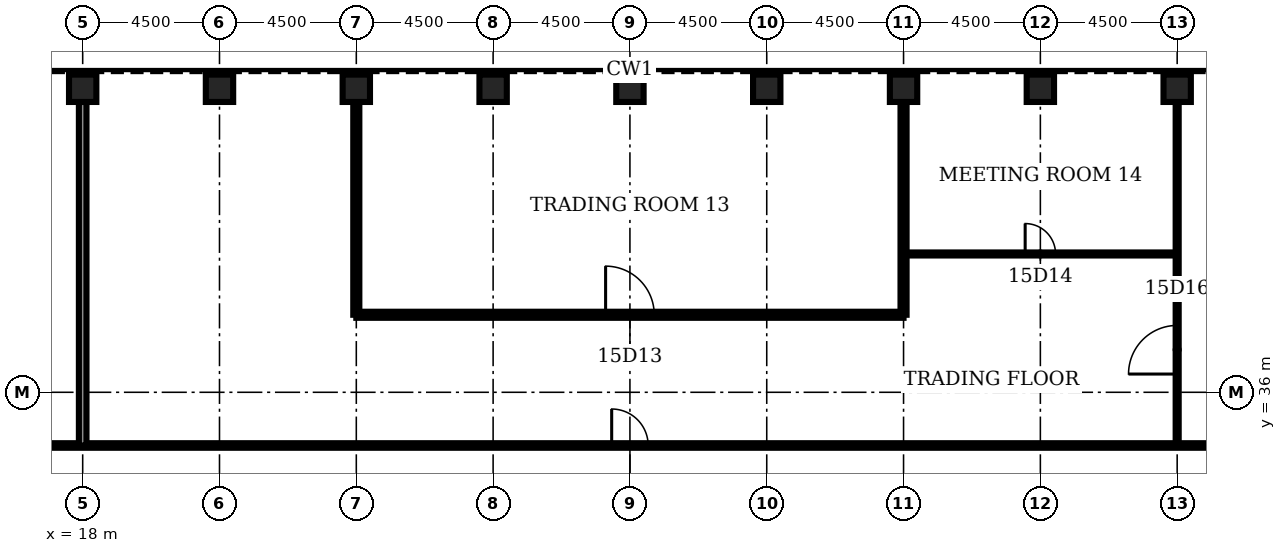
"""IFC4 building model, lengths in metres.
Left out: names, types, materials, properties, quantities, classifications, styles, units other than length and angle.
Written with IfcOpenShell. Run it as: python <this file> out.ifc"""

import sys

from ifc_helpers import new_model, si_unit, direction, frame, frame_2d, origin, origin_2d, place, context, subcontext, project, spatial, rectangle, hollow_rectangle, extrude, element, fill, save


model = new_model("IFC4")
c1 = context("Model", 3, precision=1e-05, world=origin(), true_north=direction((0.0, 1.0)))
c2 = subcontext(c1, "Body", "Model", "MODEL_VIEW")
j1 = project(units=[si_unit("LENGTHUNIT", "METRE"), si_unit("PLANEANGLEUNIT", "RADIAN")], contexts=[c1])
p1 = place(None, origin())
s1 = spatial("IfcSite", under=j1, at=p1, CompositionType="ELEMENT")
p2 = place(p1, origin())
s2 = spatial("IfcBuilding", under=s1, at=p2, CompositionType="ELEMENT")
p3 = place(p2, frame((0.0, 0.0, 72.5)))
s3 = spatial("IfcBuildingStorey", under=s2, at=p3, CompositionType="ELEMENT", Elevation=72.5)
for number, where, z_axis, x_axis in (
    (1, (54.0, 46.0, 0.0), (0.0, 0.0, 1.0), (0.0, 1.0, 0.0)),
    (2, (49.5, 46.0, 0.0), (0.0, 0.0, 1.0), (0.0, 1.0, 0.0)),
    (3, (45.0, 46.0, 0.0), (0.0, 0.0, 1.0), (0.0, 1.0, 0.0)),
    (4, (40.5, 46.0, 0.0), (0.0, 0.0, 1.0), (0.0, 1.0, 0.0)),
    (5, (36.0, 46.0, 0.0), (0.0, 0.0, 1.0), (0.0, 1.0, 0.0)),
    (6, (31.5, 46.0, 0.0), (0.0, 0.0, 1.0), (0.0, 1.0, 0.0)),
    (7, (27.0, 46.0, 0.0), (0.0, 0.0, 1.0), (0.0, 1.0, 0.0)),
    (8, (22.5, 46.0, 0.0), (0.0, 0.0, 1.0), (0.0, 1.0, 0.0)),
    (9, (18.0, 46.0, 0.0), (0.0, 0.0, 1.0), (0.0, 1.0, 0.0)),
):
    element("IfcColumn", number, at=place(p3, frame(where, z_axis=z_axis, x_axis=x_axis)), inside=s3, PredefinedType="COLUMN", context=c2, shape_type="SweptSolid", body=[
        extrude(hollow_rectangle(XDim=0.9, YDim=0.9, WallThickness=0.12, at=origin_2d()), origin(), (0.0, 0.0, 1.0), 4.5),
    ])
p4 = place(p3, frame((15.15, 34.25, 0.0), z_axis=(0.0, 0.0, 1.0), x_axis=(1.0, 0.0, 0.0)))
e10 = element("IfcWall", 10, at=p4, inside=s3, PredefinedType="PARTITIONING", context=c2, shape_type="SweptSolid", body=[
    extrude(rectangle(XDim=41.7, YDim=0.15, at=frame_2d((20.85, 0.0))), origin(), (0.0, 0.0, 1.0), 3.0),
])
p5 = place(p4, frame((20.25, 0.0, 0.0)))
e11 = element("IfcOpeningElement", 11, at=p5, cuts=e10, PredefinedType="OPENING", context=c2, shape_type="SweptSolid", body=[
    extrude(rectangle(XDim=1.2, YDim=2.1, at=frame_2d((0.6, 1.05))), frame((0.0, 0.085, 0.0), z_axis=(0.0, -1.0, 0.0), x_axis=(1.0, 0.0, 0.0)), (0.0, 0.0, 1.0), 0.17),
])
p6 = place(p3, frame((27.0, 38.55, 0.0), z_axis=(0.0, 0.0, 1.0), x_axis=(1.0, 0.0, 0.0)))
e12 = element("IfcWall", 12, at=p6, inside=s3, PredefinedType="PARTITIONING", context=c2, shape_type="SweptSolid", body=[
    extrude(rectangle(XDim=18.0, YDim=0.2, at=frame_2d((9.0, 0.0))), origin(), (0.0, 0.0, 1.0), 3.0),
])
p7 = place(p6, frame((8.2, 0.0, 0.0)))
e13 = element("IfcOpeningElement", 13, at=p7, cuts=e12, PredefinedType="OPENING", context=c2, shape_type="SweptSolid", body=[
    extrude(rectangle(XDim=1.6, YDim=2.1, at=frame_2d((0.8, 1.05))), frame((0.0, 0.11, 0.0), z_axis=(0.0, -1.0, 0.0), x_axis=(1.0, 0.0, 0.0)), (0.0, 0.0, 1.0), 0.22),
])
p8 = place(p3, frame((45.0, 40.55, 0.0), z_axis=(0.0, 0.0, 1.0), x_axis=(1.0, 0.0, 0.0)))
e14 = element("IfcWall", 14, at=p8, inside=s3, PredefinedType="PARTITIONING", context=c2, shape_type="SweptSolid", body=[
    extrude(rectangle(XDim=9.0, YDim=0.1, at=frame_2d((4.5, 0.0))), origin(), (0.0, 0.0, 1.0), 3.0),
])
p9 = place(p8, frame((4.0, 0.0, 0.0)))
e15 = element("IfcOpeningElement", 15, at=p9, cuts=e14, PredefinedType="OPENING", context=c2, shape_type="SweptSolid", body=[
    extrude(rectangle(XDim=1.0, YDim=2.1, at=frame_2d((0.5, 1.05))), frame((0.0, 0.06, 0.0), z_axis=(0.0, -1.0, 0.0), x_axis=(1.0, 0.0, 0.0)), (0.0, 0.0, 1.0), 0.12),
])
p10 = place(p3, frame((18.0, 34.25, 0.0), z_axis=(0.0, 0.0, 1.0), x_axis=(0.0, 1.0, 0.0)))
e16 = element("IfcWall", 16, at=p10, inside=s3, PredefinedType="PARTITIONING", context=c2, shape_type="SweptSolid", body=[
    extrude(rectangle(XDim=11.3, YDim=0.25, at=frame_2d((5.65, 0.0))), origin(), (0.0, 0.0, 1.0), 3.0),
])
for number, where, z_axis, x_axis in (
    (17, (27.0, 38.55, 0.0), (0.0, 0.0, 1.0), (0.0, 1.0, 0.0)),
    (18, (45.0, 38.55, 0.0), (0.0, 0.0, 1.0), (0.0, 1.0, 0.0)),
):
    element("IfcWall", number, at=place(p3, frame(where, z_axis=z_axis, x_axis=x_axis)), inside=s3, PredefinedType="PARTITIONING", context=c2, shape_type="SweptSolid", body=[
        extrude(rectangle(XDim=7.0, YDim=0.2, at=frame_2d((3.5, 0.0))), origin(), (0.0, 0.0, 1.0), 3.0),
    ])
p11 = place(p3, frame((54.0, 34.25, 0.0), z_axis=(0.0, 0.0, 1.0), x_axis=(0.0, 1.0, 0.0)))
e19 = element("IfcWall", 19, at=p11, inside=s3, PredefinedType="PARTITIONING", context=c2, shape_type="SweptSolid", body=[
    extrude(rectangle(XDim=11.3, YDim=0.1, at=frame_2d((5.65, 0.0))), origin(), (0.0, 0.0, 1.0), 3.0),
])
p12 = place(p11, frame((2.35, 0.0, 0.0)))
e20 = element("IfcOpeningElement", 20, at=p12, cuts=e19, PredefinedType="OPENING", context=c2, shape_type="SweptSolid", body=[
    extrude(rectangle(XDim=1.6, YDim=2.1, at=frame_2d((0.8, 1.05))), frame((0.0, 0.06, 0.0), z_axis=(0.0, -1.0, 0.0), x_axis=(1.0, 0.0, 0.0)), (0.0, 0.0, 1.0), 0.12),
])
p13 = place(p7, origin())
e21 = element("IfcDoor", 21, at=p13, inside=s3, OperationType="SINGLE_SWING_LEFT", PredefinedType="DOOR", context=c2, shape_type="SweptSolid", body=[
    extrude(rectangle(XDim=1.6, YDim=2.1, at=frame_2d((0.8, 1.05))), frame((0.0, 0.025, 0.0), z_axis=(0.0, -1.0, 0.0), x_axis=(1.0, 0.0, 0.0)), (0.0, 0.0, 1.0), 0.05),
])
fill(e13, e21)
p14 = place(p9, origin())
e22 = element("IfcDoor", 22, at=p14, inside=s3, OperationType="SINGLE_SWING_LEFT", PredefinedType="DOOR", context=c2, shape_type="SweptSolid", body=[
    extrude(rectangle(XDim=1.0, YDim=2.1, at=frame_2d((0.5, 1.05))), frame((0.0, 0.025, 0.0), z_axis=(0.0, -1.0, 0.0), x_axis=(1.0, 0.0, 0.0)), (0.0, 0.0, 1.0), 0.05),
])
fill(e15, e22)
p15 = place(p12, origin())
e23 = element("IfcDoor", 23, at=p15, inside=s3, OperationType="SINGLE_SWING_LEFT", PredefinedType="DOOR", context=c2, shape_type="SweptSolid", body=[
    extrude(rectangle(XDim=1.6, YDim=2.1, at=frame_2d((0.8, 1.05))), frame((0.0, 0.025, 0.0), z_axis=(0.0, -1.0, 0.0), x_axis=(1.0, 0.0, 0.0)), (0.0, 0.0, 1.0), 0.05),
])
fill(e20, e23)
p16 = place(p5, origin())
e24 = element("IfcDoor", 24, at=p16, inside=s3, OperationType="SINGLE_SWING_LEFT", PredefinedType="DOOR", context=c2, shape_type="SweptSolid", body=[
    extrude(rectangle(XDim=1.2, YDim=2.1, at=frame_2d((0.6, 1.05))), frame((0.0, 0.025, 0.0), z_axis=(0.0, -1.0, 0.0), x_axis=(1.0, 0.0, 0.0)), (0.0, 0.0, 1.0), 0.05),
])
fill(e11, e24)
save(model, sys.argv[1])
